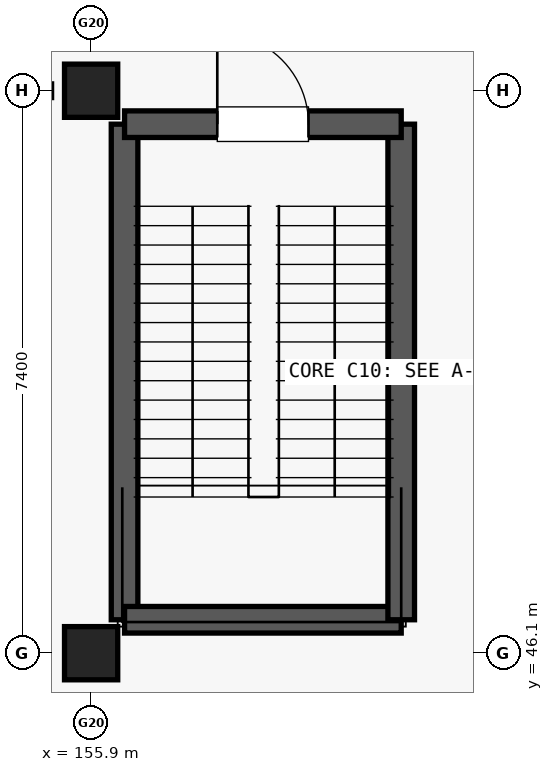
"""IFC4 building model, lengths in metres.
Left out: names, types, materials, properties, quantities, classifications, styles, units other than length and angle.
Written with IfcOpenShell. Run it as: python <this file> out.ifc"""

import sys

from ifc_helpers import new_model, si_unit, direction, frame, frame_2d, origin, origin_2d, place, context, subcontext, project, spatial, rectangle, extrude, element, fill, save


model = new_model("IFC4")
c1 = context("Model", 3, precision=1e-05, world=origin(), true_north=direction((0.0, 1.0)))
c2 = subcontext(c1, "Body", "Model", "MODEL_VIEW")
j1 = project(units=[si_unit("LENGTHUNIT", "METRE"), si_unit("PLANEANGLEUNIT", "RADIAN")], contexts=[c1])
p1 = place(None, origin())
s1 = spatial("IfcSite", under=j1, at=p1, CompositionType="ELEMENT")
p2 = place(p1, origin())
s2 = spatial("IfcBuilding", under=s1, at=p2, CompositionType="ELEMENT")
p3 = place(p2, origin())
s3 = spatial("IfcBuildingStorey", under=s2, at=p3, CompositionType="ELEMENT", Elevation=0.0)
for number, where, z_axis, x_axis in (
    (1, (155.9, 46.1, -0.28), (0.0, 0.0, 1.0), (1.0, 0.0, 0.0)),
    (2, (155.9, 53.5, -0.28), (0.0, 0.0, 1.0), (1.0, 0.0, 0.0)),
):
    element("IfcColumn", number, at=place(p3, frame(where, z_axis=z_axis, x_axis=x_axis)), inside=s3, PredefinedType="COLUMN", context=c2, shape_type="SweptSolid", body=[
        extrude(rectangle(XDim=0.7, YDim=0.7, at=origin_2d()), origin(), (0.0, 0.0, 1.0), 5.415),
    ])
p4 = place(p3, frame((156.34, 46.54, 0.0), z_axis=(0.0, 0.0, 1.0), x_axis=(0.0, 1.0, 0.0)))
e3 = element("IfcWall", 3, at=p4, inside=s3, PredefinedType="SHEAR", context=c2, shape_type="SweptSolid", body=[
    extrude(rectangle(XDim=6.52, YDim=0.35, at=frame_2d((3.26, 0.0))), origin(), (0.0, 0.0, 1.0), 5.13),
])
p5 = place(p3, frame((156.34, 46.54, 0.0), z_axis=(0.0, 0.0, 1.0), x_axis=(1.0, 0.0, 0.0)))
e4 = element("IfcWall", 4, at=p5, inside=s3, PredefinedType="SHEAR", context=c2, shape_type="SweptSolid", body=[
    extrude(rectangle(XDim=3.64, YDim=0.35, at=frame_2d((1.82, 0.0))), origin(), (0.0, 0.0, 1.0), 5.13),
])
p6 = place(p3, frame((159.98, 46.54, 0.0), z_axis=(0.0, 0.0, 1.0), x_axis=(0.0, 1.0, 0.0)))
e5 = element("IfcWall", 5, at=p6, inside=s3, PredefinedType="SHEAR", context=c2, shape_type="SweptSolid", body=[
    extrude(rectangle(XDim=6.52, YDim=0.35, at=frame_2d((3.26, 0.0))), origin(), (0.0, 0.0, 1.0), 5.13),
])
p7 = place(p3, frame((156.34, 53.06, 0.0), z_axis=(0.0, 0.0, 1.0), x_axis=(1.0, 0.0, 0.0)))
e6 = element("IfcWall", 6, at=p7, inside=s3, PredefinedType="SHEAR", context=c2, shape_type="SweptSolid", body=[
    extrude(rectangle(XDim=3.64, YDim=0.35, at=frame_2d((1.82, 0.0))), origin(), (0.0, 0.0, 1.0), 5.13),
])
p8 = place(p7, frame((1.22, 0.0, 0.0)))
e7 = element("IfcOpeningElement", 7, at=p8, cuts=e6, PredefinedType="OPENING", context=c2, shape_type="SweptSolid", body=[
    extrude(rectangle(XDim=1.2, YDim=2.15, at=frame_2d((0.6, 1.075))), frame((0.0, 0.185, 0.0), z_axis=(0.0, -1.0, 0.0), x_axis=(1.0, 0.0, 0.0)), (0.0, 0.0, 1.0), 0.37),
])
p9 = place(p8, origin())
e8 = element("IfcDoor", 8, at=p9, inside=s3, OperationType="SINGLE_SWING_LEFT", PredefinedType="DOOR", context=c2, shape_type="SweptSolid", body=[
    extrude(rectangle(XDim=1.2, YDim=2.15, at=frame_2d((0.6, 1.075))), frame((0.0, 0.025, 0.0), z_axis=(0.0, -1.0, 0.0), x_axis=(1.0, 0.0, 0.0)), (0.0, 0.0, 1.0), 0.05),
])
fill(e7, e8)
save(model, sys.argv[1])
